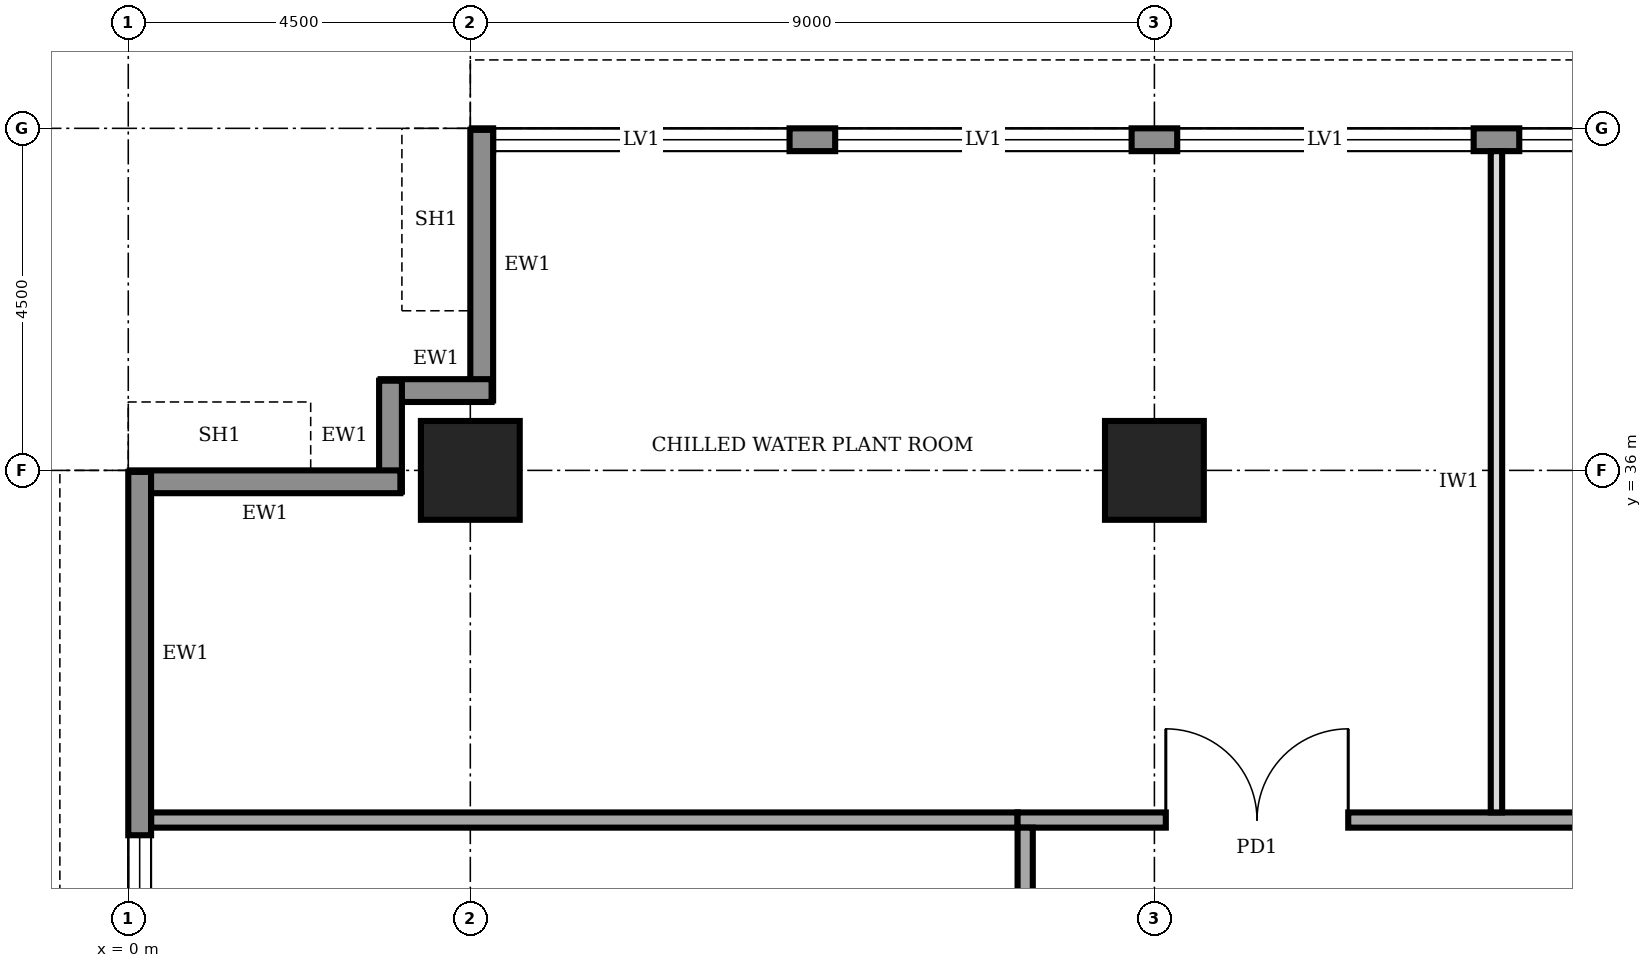
"""IFC4 building model, lengths in metres.
Left out: names, types, materials, properties, quantities, classifications, styles, units other than length and angle.
Written with IfcOpenShell. Run it as: python <this file> out.ifc"""

import sys

from ifc_helpers import new_model, si_unit, direction, frame, frame_2d, origin, origin_2d, place, context, subcontext, project, spatial, rectangle, extrude, element, fill, save


model = new_model("IFC4")
c1 = context("Model", 3, precision=1e-05, world=origin(), true_north=direction((0.0, 1.0)))
c2 = subcontext(c1, "Body", "Model", "MODEL_VIEW")
j1 = project(units=[si_unit("LENGTHUNIT", "METRE"), si_unit("PLANEANGLEUNIT", "RADIAN")], contexts=[c1])
p1 = place(None, origin())
s1 = spatial("IfcSite", under=j1, at=p1, CompositionType="ELEMENT")
p2 = place(p1, origin())
s2 = spatial("IfcBuilding", under=s1, at=p2, CompositionType="ELEMENT")
p3 = place(p2, frame((0.0, 0.0, 289.0)))
s3 = spatial("IfcBuildingStorey", under=s2, at=p3, CompositionType="ELEMENT", Elevation=289.0)
for number, where, z_axis, x_axis in (
    (1, (4.5, 36.0, 0.0), (0.0, 0.0, 1.0), (1.0, 0.0, 0.0)),
    (2, (13.5, 36.0, 0.0), (0.0, 0.0, 1.0), (1.0, 0.0, 0.0)),
):
    element("IfcColumn", number, at=place(p3, frame(where, z_axis=z_axis, x_axis=x_axis)), inside=s3, PredefinedType="COLUMN", context=c2, shape_type="SweptSolid", body=[
        extrude(rectangle(XDim=1.3, YDim=1.3, at=origin_2d()), origin(), (0.0, 0.0, 1.0), 4.0),
    ])
p4 = place(p3, frame((35.98, 40.35, 0.0), z_axis=(0.0, 0.0, 1.0), x_axis=(-1.0, 0.0, 0.0)))
e3 = element("IfcWall", 3, at=p4, inside=s3, PredefinedType="STANDARD", context=c2, shape_type="SweptSolid", body=[
    extrude(rectangle(XDim=31.46, YDim=0.3, at=frame_2d((15.73, 0.0))), origin(), (0.0, 0.0, 1.0), 3.75),
])
p5 = place(p4, frame((27.28, 0.0, 0.9)))
e4 = element("IfcOpeningElement", 4, at=p5, cuts=e3, PredefinedType="OPENING", context=c2, shape_type="SweptSolid", body=[
    extrude(rectangle(XDim=3.9, YDim=2.2, at=frame_2d((1.95, 1.1))), frame((0.0, 0.16, 0.0), z_axis=(0.0, -1.0, 0.0), x_axis=(1.0, 0.0, 0.0)), (0.0, 0.0, 1.0), 0.32),
])
p6 = place(p4, frame((22.78, 0.0, 0.9)))
e5 = element("IfcOpeningElement", 5, at=p6, cuts=e3, PredefinedType="OPENING", context=c2, shape_type="SweptSolid", body=[
    extrude(rectangle(XDim=3.9, YDim=2.2, at=frame_2d((1.95, 1.1))), frame((0.0, 0.16, 0.0), z_axis=(0.0, -1.0, 0.0), x_axis=(1.0, 0.0, 0.0)), (0.0, 0.0, 1.0), 0.32),
])
p7 = place(p4, frame((18.28, 0.0, 0.9)))
e6 = element("IfcOpeningElement", 6, at=p7, cuts=e3, PredefinedType="OPENING", context=c2, shape_type="SweptSolid", body=[
    extrude(rectangle(XDim=3.9, YDim=2.2, at=frame_2d((1.95, 1.1))), frame((0.0, 0.16, 0.0), z_axis=(0.0, -1.0, 0.0), x_axis=(1.0, 0.0, 0.0)), (0.0, 0.0, 1.0), 0.32),
])
p8 = place(p4, frame((13.78, 0.0, 0.9)))
e7 = element("IfcOpeningElement", 7, at=p8, cuts=e3, PredefinedType="OPENING", context=c2, shape_type="SweptSolid", body=[
    extrude(rectangle(XDim=3.9, YDim=2.2, at=frame_2d((1.95, 1.1))), frame((0.0, 0.16, 0.0), z_axis=(0.0, -1.0, 0.0), x_axis=(1.0, 0.0, 0.0)), (0.0, 0.0, 1.0), 0.32),
])
p9 = place(p4, frame((9.28, 0.0, 0.9)))
e8 = element("IfcOpeningElement", 8, at=p9, cuts=e3, PredefinedType="OPENING", context=c2, shape_type="SweptSolid", body=[
    extrude(rectangle(XDim=3.9, YDim=2.2, at=frame_2d((1.95, 1.1))), frame((0.0, 0.16, 0.0), z_axis=(0.0, -1.0, 0.0), x_axis=(1.0, 0.0, 0.0)), (0.0, 0.0, 1.0), 0.32),
])
p10 = place(p4, frame((4.78, 0.0, 0.9)))
e9 = element("IfcOpeningElement", 9, at=p10, cuts=e3, PredefinedType="OPENING", context=c2, shape_type="SweptSolid", body=[
    extrude(rectangle(XDim=3.9, YDim=2.2, at=frame_2d((1.95, 1.1))), frame((0.0, 0.16, 0.0), z_axis=(0.0, -1.0, 0.0), x_axis=(1.0, 0.0, 0.0)), (0.0, 0.0, 1.0), 0.32),
])
p11 = place(p3, frame((4.65, 40.48, 0.0), z_axis=(0.0, 0.0, 1.0), x_axis=(0.0, -1.0, 0.0)))
e10 = element("IfcWall", 10, at=p11, inside=s3, PredefinedType="STANDARD", context=c2, shape_type="SweptSolid", body=[
    extrude(rectangle(XDim=3.56, YDim=0.3, at=frame_2d((1.78, 0.0))), origin(), (0.0, 0.0, 1.0), 2.85),
])
for number, where, z_axis, x_axis in (
    (11, (4.78, 37.05, 0.0), (0.0, 0.0, 1.0), (-1.0, 0.0, 0.0)),
    (12, (3.45, 37.18, 0.0), (0.0, 0.0, 1.0), (0.0, -1.0, 0.0)),
):
    element("IfcWall", number, at=place(p3, frame(where, z_axis=z_axis, x_axis=x_axis)), inside=s3, PredefinedType="STANDARD", context=c2, shape_type="SweptSolid", body=[
        extrude(rectangle(XDim=1.46, YDim=0.3, at=frame_2d((0.73, 0.0))), origin(), (0.0, 0.0, 1.0), 3.75),
    ])
p12 = place(p3, frame((3.58, 35.85, 0.0), z_axis=(0.0, 0.0, 1.0), x_axis=(-1.0, 0.0, 0.0)))
e13 = element("IfcWall", 13, at=p12, inside=s3, PredefinedType="STANDARD", context=c2, shape_type="SweptSolid", body=[
    extrude(rectangle(XDim=3.56, YDim=0.3, at=frame_2d((1.78, 0.0))), origin(), (0.0, 0.0, 1.0), 2.85),
])
p13 = place(p3, frame((0.15, 35.98, 0.0), z_axis=(0.0, 0.0, 1.0), x_axis=(0.0, -1.0, 0.0)))
e14 = element("IfcWall", 14, at=p13, inside=s3, PredefinedType="STANDARD", context=c2, shape_type="SweptSolid", body=[
    extrude(rectangle(XDim=31.46, YDim=0.3, at=frame_2d((15.73, 0.0))), origin(), (0.0, 0.0, 1.0), 3.75),
])
p14 = place(p13, frame((27.28, 0.0, 0.9)))
e15 = element("IfcOpeningElement", 15, at=p14, cuts=e14, PredefinedType="OPENING", context=c2, shape_type="SweptSolid", body=[
    extrude(rectangle(XDim=3.9, YDim=2.2, at=frame_2d((1.95, 1.1))), frame((0.0, 0.16, 0.0), z_axis=(0.0, -1.0, 0.0), x_axis=(1.0, 0.0, 0.0)), (0.0, 0.0, 1.0), 0.32),
])
p15 = place(p13, frame((22.78, 0.0, 0.9)))
e16 = element("IfcOpeningElement", 16, at=p15, cuts=e14, PredefinedType="OPENING", context=c2, shape_type="SweptSolid", body=[
    extrude(rectangle(XDim=3.9, YDim=2.2, at=frame_2d((1.95, 1.1))), frame((0.0, 0.16, 0.0), z_axis=(0.0, -1.0, 0.0), x_axis=(1.0, 0.0, 0.0)), (0.0, 0.0, 1.0), 0.32),
])
p16 = place(p13, frame((18.28, 0.0, 0.9)))
e17 = element("IfcOpeningElement", 17, at=p16, cuts=e14, PredefinedType="OPENING", context=c2, shape_type="SweptSolid", body=[
    extrude(rectangle(XDim=3.9, YDim=2.2, at=frame_2d((1.95, 1.1))), frame((0.0, 0.16, 0.0), z_axis=(0.0, -1.0, 0.0), x_axis=(1.0, 0.0, 0.0)), (0.0, 0.0, 1.0), 0.32),
])
p17 = place(p13, frame((13.78, 0.0, 0.9)))
e18 = element("IfcOpeningElement", 18, at=p17, cuts=e14, PredefinedType="OPENING", context=c2, shape_type="SweptSolid", body=[
    extrude(rectangle(XDim=3.9, YDim=2.2, at=frame_2d((1.95, 1.1))), frame((0.0, 0.16, 0.0), z_axis=(0.0, -1.0, 0.0), x_axis=(1.0, 0.0, 0.0)), (0.0, 0.0, 1.0), 0.32),
])
p18 = place(p13, frame((9.28, 0.0, 0.9)))
e19 = element("IfcOpeningElement", 19, at=p18, cuts=e14, PredefinedType="OPENING", context=c2, shape_type="SweptSolid", body=[
    extrude(rectangle(XDim=3.9, YDim=2.2, at=frame_2d((1.95, 1.1))), frame((0.0, 0.16, 0.0), z_axis=(0.0, -1.0, 0.0), x_axis=(1.0, 0.0, 0.0)), (0.0, 0.0, 1.0), 0.32),
])
p19 = place(p13, frame((4.78, 0.0, 0.9)))
e20 = element("IfcOpeningElement", 20, at=p19, cuts=e14, PredefinedType="OPENING", context=c2, shape_type="SweptSolid", body=[
    extrude(rectangle(XDim=3.9, YDim=2.2, at=frame_2d((1.95, 1.1))), frame((0.0, 0.16, 0.0), z_axis=(0.0, -1.0, 0.0), x_axis=(1.0, 0.0, 0.0)), (0.0, 0.0, 1.0), 0.32),
])
p20 = place(p3, frame((28.6, 31.4, 0.0), z_axis=(0.0, 0.0, 1.0), x_axis=(-1.0, 0.0, 0.0)))
e21 = element("IfcWall", 21, at=p20, inside=s3, PredefinedType="SOLIDWALL", context=c2, shape_type="SweptSolid", body=[
    extrude(rectangle(XDim=16.9, YDim=0.2, at=frame_2d((8.45, 0.0))), origin(), (0.0, 0.0, 1.0), 3.75),
])
p21 = place(p20, frame((12.55, 0.0, 0.0)))
e22 = element("IfcOpeningElement", 22, at=p21, cuts=e21, PredefinedType="OPENING", context=c2, shape_type="SweptSolid", body=[
    extrude(rectangle(XDim=2.4, YDim=2.7, at=frame_2d((1.2, 1.35))), frame((0.0, 0.11, 0.0), z_axis=(0.0, -1.0, 0.0), x_axis=(1.0, 0.0, 0.0)), (0.0, 0.0, 1.0), 0.22),
])
p22 = place(p20, frame((4.3, 0.0, 0.0)))
e23 = element("IfcOpeningElement", 23, at=p22, cuts=e21, PredefinedType="OPENING", context=c2, shape_type="SweptSolid", body=[
    extrude(rectangle(XDim=1.8, YDim=2.1, at=frame_2d((0.9, 1.05))), frame((0.0, 0.11, 0.0), z_axis=(0.0, -1.0, 0.0), x_axis=(1.0, 0.0, 0.0)), (0.0, 0.0, 1.0), 0.22),
])
p23 = place(p3, frame((11.8, 31.3, 0.0), z_axis=(0.0, 0.0, 1.0), x_axis=(0.0, -1.0, 0.0)))
e24 = element("IfcWall", 24, at=p23, inside=s3, PredefinedType="SOLIDWALL", context=c2, shape_type="SweptSolid", body=[
    extrude(rectangle(XDim=22.3, YDim=0.2, at=frame_2d((11.15, 0.0))), origin(), (0.0, 0.0, 1.0), 3.75),
])
p24 = place(p23, frame((19.55, 0.0, 0.0)))
e25 = element("IfcOpeningElement", 25, at=p24, cuts=e24, PredefinedType="OPENING", context=c2, shape_type="SweptSolid", body=[
    extrude(rectangle(XDim=1.0, YDim=2.1, at=frame_2d((0.5, 1.05))), frame((0.0, 0.11, 0.0), z_axis=(0.0, -1.0, 0.0), x_axis=(1.0, 0.0, 0.0)), (0.0, 0.0, 1.0), 0.22),
])
p25 = place(p23, frame((15.45, 0.0, 0.0)))
e26 = element("IfcOpeningElement", 26, at=p25, cuts=e24, PredefinedType="OPENING", context=c2, shape_type="SweptSolid", body=[
    extrude(rectangle(XDim=0.9, YDim=2.1, at=frame_2d((0.45, 1.05))), frame((0.0, 0.11, 0.0), z_axis=(0.0, -1.0, 0.0), x_axis=(1.0, 0.0, 0.0)), (0.0, 0.0, 1.0), 0.22),
])
p26 = place(p23, frame((12.45, 0.0, 0.0)))
e27 = element("IfcOpeningElement", 27, at=p26, cuts=e24, PredefinedType="OPENING", context=c2, shape_type="SweptSolid", body=[
    extrude(rectangle(XDim=0.9, YDim=2.1, at=frame_2d((0.45, 1.05))), frame((0.0, 0.11, 0.0), z_axis=(0.0, -1.0, 0.0), x_axis=(1.0, 0.0, 0.0)), (0.0, 0.0, 1.0), 0.22),
])
p27 = place(p23, frame((7.6, 0.0, 0.0)))
e28 = element("IfcOpeningElement", 28, at=p27, cuts=e24, PredefinedType="OPENING", context=c2, shape_type="SweptSolid", body=[
    extrude(rectangle(XDim=0.9, YDim=2.1, at=frame_2d((0.45, 1.05))), frame((0.0, 0.11, 0.0), z_axis=(0.0, -1.0, 0.0), x_axis=(1.0, 0.0, 0.0)), (0.0, 0.0, 1.0), 0.22),
])
p28 = place(p23, frame((4.8, 0.0, 0.0)))
e29 = element("IfcOpeningElement", 29, at=p28, cuts=e24, PredefinedType="OPENING", context=c2, shape_type="SweptSolid", body=[
    extrude(rectangle(XDim=1.0, YDim=2.1, at=frame_2d((0.5, 1.05))), frame((0.0, 0.11, 0.0), z_axis=(0.0, -1.0, 0.0), x_axis=(1.0, 0.0, 0.0)), (0.0, 0.0, 1.0), 0.22),
])
p29 = place(p23, frame((10.3, 0.0, 0.0)))
e30 = element("IfcOpeningElement", 30, at=p29, cuts=e24, PredefinedType="OPENING", context=c2, shape_type="SweptSolid", body=[
    extrude(rectangle(XDim=1.0, YDim=2.1, at=frame_2d((0.5, 1.05))), frame((0.0, 0.11, 0.0), z_axis=(0.0, -1.0, 0.0), x_axis=(1.0, 0.0, 0.0)), (0.0, 0.0, 1.0), 0.22),
])
p30 = place(p23, frame((1.55, 0.0, 0.0)))
e31 = element("IfcOpeningElement", 31, at=p30, cuts=e24, PredefinedType="OPENING", context=c2, shape_type="SweptSolid", body=[
    extrude(rectangle(XDim=1.0, YDim=2.1, at=frame_2d((0.5, 1.05))), frame((0.0, 0.11, 0.0), z_axis=(0.0, -1.0, 0.0), x_axis=(1.0, 0.0, 0.0)), (0.0, 0.0, 1.0), 0.22),
])
p31 = place(p3, frame((0.3, 31.4, 0.0), z_axis=(0.0, 0.0, 1.0), x_axis=(1.0, 0.0, 0.0)))
e32 = element("IfcWall", 32, at=p31, inside=s3, PredefinedType="SOLIDWALL", context=c2, shape_type="SweptSolid", body=[
    extrude(rectangle(XDim=11.4, YDim=0.2, at=frame_2d((5.7, 0.0))), origin(), (0.0, 0.0, 1.0), 3.75),
])
p32 = place(p3, frame((18.0, 31.5, 0.0), z_axis=(0.0, 0.0, 1.0), x_axis=(0.0, 1.0, 0.0)))
e33 = element("IfcWall", 33, at=p32, inside=s3, PredefinedType="PARTITIONING", context=c2, shape_type="SweptSolid", body=[
    extrude(rectangle(XDim=8.7, YDim=0.15, at=frame_2d((4.35, 0.0))), origin(), (0.0, 0.0, 1.0), 3.75),
])
p33 = place(p5, origin())
e34 = element("IfcWindow", 34, at=p33, inside=s3, PartitioningType="SINGLE_PANEL", PredefinedType="WINDOW", context=c2, shape_type="SweptSolid", body=[
    extrude(rectangle(XDim=3.9, YDim=2.2, at=frame_2d((1.95, 1.1))), frame((0.0, 0.03, 0.0), z_axis=(0.0, -1.0, 0.0), x_axis=(1.0, 0.0, 0.0)), (0.0, 0.0, 1.0), 0.06),
])
fill(e4, e34)
p34 = place(p6, origin())
e35 = element("IfcWindow", 35, at=p34, inside=s3, PartitioningType="SINGLE_PANEL", PredefinedType="WINDOW", context=c2, shape_type="SweptSolid", body=[
    extrude(rectangle(XDim=3.9, YDim=2.2, at=frame_2d((1.95, 1.1))), frame((0.0, 0.03, 0.0), z_axis=(0.0, -1.0, 0.0), x_axis=(1.0, 0.0, 0.0)), (0.0, 0.0, 1.0), 0.06),
])
fill(e5, e35)
p35 = place(p7, origin())
e36 = element("IfcWindow", 36, at=p35, inside=s3, PartitioningType="SINGLE_PANEL", PredefinedType="WINDOW", context=c2, shape_type="SweptSolid", body=[
    extrude(rectangle(XDim=3.9, YDim=2.2, at=frame_2d((1.95, 1.1))), frame((0.0, 0.03, 0.0), z_axis=(0.0, -1.0, 0.0), x_axis=(1.0, 0.0, 0.0)), (0.0, 0.0, 1.0), 0.06),
])
fill(e6, e36)
p36 = place(p8, origin())
e37 = element("IfcWindow", 37, at=p36, inside=s3, PartitioningType="SINGLE_PANEL", PredefinedType="WINDOW", context=c2, shape_type="SweptSolid", body=[
    extrude(rectangle(XDim=3.9, YDim=2.2, at=frame_2d((1.95, 1.1))), frame((0.0, 0.03, 0.0), z_axis=(0.0, -1.0, 0.0), x_axis=(1.0, 0.0, 0.0)), (0.0, 0.0, 1.0), 0.06),
])
fill(e7, e37)
p37 = place(p19, origin())
e38 = element("IfcWindow", 38, at=p37, inside=s3, PartitioningType="SINGLE_PANEL", PredefinedType="WINDOW", context=c2, shape_type="SweptSolid", body=[
    extrude(rectangle(XDim=3.9, YDim=2.2, at=frame_2d((1.95, 1.1))), frame((0.0, 0.03, 0.0), z_axis=(0.0, -1.0, 0.0), x_axis=(1.0, 0.0, 0.0)), (0.0, 0.0, 1.0), 0.06),
])
fill(e20, e38)
p38 = place(p21, frame((2.4, 0.0, 0.0), z_axis=(0.0, 0.0, 1.0), x_axis=(-1.0, 0.0, 0.0)))
e39 = element("IfcDoor", 39, at=p38, inside=s3, OperationType="DOUBLE_DOOR_SINGLE_SWING", PredefinedType="DOOR", context=c2, shape_type="SweptSolid", body=[
    extrude(rectangle(XDim=2.4, YDim=2.7, at=frame_2d((1.2, 1.35))), frame((0.0, 0.025, 0.0), z_axis=(0.0, -1.0, 0.0), x_axis=(1.0, 0.0, 0.0)), (0.0, 0.0, 1.0), 0.05),
])
fill(e22, e39)
save(model, sys.argv[1])
